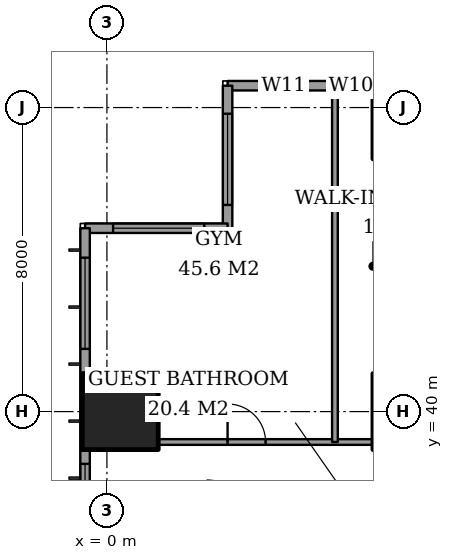
"""IFC4 building model, lengths in metres.
Left out: names, types, materials, properties, quantities, classifications, styles, units other than length and angle.
Written with IfcOpenShell. Run it as: python <this file> out.ifc"""

import sys

from ifc_helpers import new_model, si_unit, direction, frame, frame_2d, origin, origin_2d, place, context, subcontext, project, spatial, rectangle, extrude, element, fill, save


model = new_model("IFC4")
c1 = context("Model", 3, precision=1e-05, world=origin(), true_north=direction((0.0, 1.0)))
c2 = subcontext(c1, "Body", "Model", "MODEL_VIEW")
j1 = project(units=[si_unit("LENGTHUNIT", "METRE"), si_unit("PLANEANGLEUNIT", "RADIAN")], contexts=[c1])
p1 = place(None, origin())
s1 = spatial("IfcSite", under=j1, at=p1, CompositionType="ELEMENT")
p2 = place(p1, origin())
s2 = spatial("IfcBuilding", under=s1, at=p2, CompositionType="ELEMENT")
p3 = place(p2, frame((0.0, 0.0, 114.2)))
s3 = spatial("IfcBuildingStorey", under=s2, at=p3, CompositionType="ELEMENT", Elevation=114.2)
p4 = place(p3, frame((0.35, 40.0, 0.0), z_axis=(0.0, 0.0, 1.0), x_axis=(1.0, 0.0, 0.0)))
e1 = element("IfcColumn", 1, at=p4, inside=s3, PredefinedType="COLUMN", context=c2, shape_type="SweptSolid", body=[
    extrude(rectangle(XDim=2.0, YDim=2.0, at=origin_2d()), origin(), (0.0, 0.0, 1.0), 3.6),
])
p5 = place(p3, frame((24.575, 48.575, 0.0), z_axis=(0.0, 0.0, 1.0), x_axis=(-1.0, 0.0, 0.0)))
e2 = element("IfcWall", 2, at=p5, inside=s3, PredefinedType="SOLIDWALL", context=c2, shape_type="SweptSolid", body=[
    extrude(rectangle(XDim=21.4, YDim=0.25, at=frame_2d((10.7, 0.0))), origin(), (0.0, 0.0, 1.0), 3.6),
])
p6 = place(p5, frame((2.275, 0.0, 0.4)))
e3 = element("IfcOpeningElement", 3, at=p6, cuts=e2, PredefinedType="OPENING", context=c2, shape_type="SweptSolid", body=[
    extrude(rectangle(XDim=1.2, YDim=2.2, at=frame_2d((0.6, 1.1))), frame((0.0, 0.135, 0.0), z_axis=(0.0, -1.0, 0.0), x_axis=(1.0, 0.0, 0.0)), (0.0, 0.0, 1.0), 0.27),
])
p7 = place(p5, frame((4.425, 0.0, 0.4)))
e4 = element("IfcOpeningElement", 4, at=p7, cuts=e2, PredefinedType="OPENING", context=c2, shape_type="SweptSolid", body=[
    extrude(rectangle(XDim=2.4, YDim=2.2, at=frame_2d((1.2, 1.1))), frame((0.0, 0.135, 0.0), z_axis=(0.0, -1.0, 0.0), x_axis=(1.0, 0.0, 0.0)), (0.0, 0.0, 1.0), 0.27),
])
p8 = place(p5, frame((10.4, 0.0, 0.4)))
e5 = element("IfcOpeningElement", 5, at=p8, cuts=e2, PredefinedType="OPENING", context=c2, shape_type="SweptSolid", body=[
    extrude(rectangle(XDim=1.2, YDim=2.2, at=frame_2d((0.6, 1.1))), frame((0.0, 0.135, 0.0), z_axis=(0.0, -1.0, 0.0), x_axis=(1.0, 0.0, 0.0)), (0.0, 0.0, 1.0), 0.27),
])
p9 = place(p5, frame((12.475, 0.0, 0.4)))
e6 = element("IfcOpeningElement", 6, at=p9, cuts=e2, PredefinedType="OPENING", context=c2, shape_type="SweptSolid", body=[
    extrude(rectangle(XDim=2.4, YDim=2.2, at=frame_2d((1.2, 1.1))), frame((0.0, 0.135, 0.0), z_axis=(0.0, -1.0, 0.0), x_axis=(1.0, 0.0, 0.0)), (0.0, 0.0, 1.0), 0.27),
])
p10 = place(p5, frame((17.85, 0.0, 0.4)))
e7 = element("IfcOpeningElement", 7, at=p10, cuts=e2, PredefinedType="OPENING", context=c2, shape_type="SweptSolid", body=[
    extrude(rectangle(XDim=0.6, YDim=2.2, at=frame_2d((0.3, 1.1))), frame((0.0, 0.135, 0.0), z_axis=(0.0, -1.0, 0.0), x_axis=(1.0, 0.0, 0.0)), (0.0, 0.0, 1.0), 0.27),
])
p11 = place(p5, frame((19.325, 0.0, 0.4)))
e8 = element("IfcOpeningElement", 8, at=p11, cuts=e2, PredefinedType="OPENING", context=c2, shape_type="SweptSolid", body=[
    extrude(rectangle(XDim=1.2, YDim=2.2, at=frame_2d((0.6, 1.1))), frame((0.0, 0.135, 0.0), z_axis=(0.0, -1.0, 0.0), x_axis=(1.0, 0.0, 0.0)), (0.0, 0.0, 1.0), 0.27),
])
p12 = place(p3, frame((3.175, 48.575, 0.0), z_axis=(0.0, 0.0, 1.0), x_axis=(0.0, -1.0, 0.0)))
e9 = element("IfcWall", 9, at=p12, inside=s3, PredefinedType="SOLIDWALL", context=c2, shape_type="SweptSolid", body=[
    extrude(rectangle(XDim=3.75, YDim=0.25, at=frame_2d((1.875, 0.0))), origin(), (0.0, 0.0, 1.0), 3.6),
])
p13 = place(p12, frame((0.738, 0.0, 0.4)))
e10 = element("IfcOpeningElement", 10, at=p13, cuts=e9, PredefinedType="OPENING", context=c2, shape_type="SweptSolid", body=[
    extrude(rectangle(XDim=2.4, YDim=2.2, at=frame_2d((1.2, 1.1))), frame((0.0, 0.135, 0.0), z_axis=(0.0, -1.0, 0.0), x_axis=(1.0, 0.0, 0.0)), (0.0, 0.0, 1.0), 0.27),
])
p14 = place(p3, frame((3.175, 44.825, 0.0), z_axis=(0.0, 0.0, 1.0), x_axis=(-1.0, 0.0, 0.0)))
e11 = element("IfcWall", 11, at=p14, inside=s3, PredefinedType="SOLIDWALL", context=c2, shape_type="SweptSolid", body=[
    extrude(rectangle(XDim=3.75, YDim=0.25, at=frame_2d((1.875, 0.0))), origin(), (0.0, 0.0, 1.0), 3.6),
])
p15 = place(p14, frame((0.613, 0.0, 0.4)))
e12 = element("IfcOpeningElement", 12, at=p15, cuts=e11, PredefinedType="OPENING", context=c2, shape_type="SweptSolid", body=[
    extrude(rectangle(XDim=2.4, YDim=2.2, at=frame_2d((1.2, 1.1))), frame((0.0, 0.135, 0.0), z_axis=(0.0, -1.0, 0.0), x_axis=(1.0, 0.0, 0.0)), (0.0, 0.0, 1.0), 0.27),
])
p16 = place(p3, frame((-0.575, 44.825, 0.0), z_axis=(0.0, 0.0, 1.0), x_axis=(0.0, -1.0, 0.0)))
e13 = element("IfcWall", 13, at=p16, inside=s3, PredefinedType="SOLIDWALL", context=c2, shape_type="SweptSolid", body=[
    extrude(rectangle(XDim=41.65, YDim=0.25, at=frame_2d((20.825, 0.0))), origin(), (0.0, 0.0, 1.0), 3.6),
])
p17 = place(p16, frame((0.775, 0.0, 0.4)))
e14 = element("IfcOpeningElement", 14, at=p17, cuts=e13, PredefinedType="OPENING", context=c2, shape_type="SweptSolid", body=[
    extrude(rectangle(XDim=2.4, YDim=2.2, at=frame_2d((1.2, 1.1))), frame((0.0, 0.135, 0.0), z_axis=(0.0, -1.0, 0.0), x_axis=(1.0, 0.0, 0.0)), (0.0, 0.0, 1.0), 0.27),
])
p18 = place(p16, frame((6.2, 0.0, 0.4)))
e15 = element("IfcOpeningElement", 15, at=p18, cuts=e13, PredefinedType="OPENING", context=c2, shape_type="SweptSolid", body=[
    extrude(rectangle(XDim=1.2, YDim=2.2, at=frame_2d((0.6, 1.1))), frame((0.0, 0.135, 0.0), z_axis=(0.0, -1.0, 0.0), x_axis=(1.0, 0.0, 0.0)), (0.0, 0.0, 1.0), 0.27),
])
p19 = place(p16, frame((8.525, 0.0, 0.4)))
e16 = element("IfcOpeningElement", 16, at=p19, cuts=e13, PredefinedType="OPENING", context=c2, shape_type="SweptSolid", body=[
    extrude(rectangle(XDim=2.4, YDim=2.2, at=frame_2d((1.2, 1.1))), frame((0.0, 0.135, 0.0), z_axis=(0.0, -1.0, 0.0), x_axis=(1.0, 0.0, 0.0)), (0.0, 0.0, 1.0), 0.27),
])
p20 = place(p16, frame((15.625, 0.0, 0.4)))
e17 = element("IfcOpeningElement", 17, at=p20, cuts=e13, PredefinedType="OPENING", context=c2, shape_type="SweptSolid", body=[
    extrude(rectangle(XDim=2.4, YDim=2.2, at=frame_2d((1.2, 1.1))), frame((0.0, 0.135, 0.0), z_axis=(0.0, -1.0, 0.0), x_axis=(1.0, 0.0, 0.0)), (0.0, 0.0, 1.0), 0.27),
])
p21 = place(p16, frame((23.625, 0.0, 0.4)))
e18 = element("IfcOpeningElement", 18, at=p21, cuts=e13, PredefinedType="OPENING", context=c2, shape_type="SweptSolid", body=[
    extrude(rectangle(XDim=2.4, YDim=2.2, at=frame_2d((1.2, 1.1))), frame((0.0, 0.135, 0.0), z_axis=(0.0, -1.0, 0.0), x_axis=(1.0, 0.0, 0.0)), (0.0, 0.0, 1.0), 0.27),
])
p22 = place(p16, frame((30.825, 0.0, 0.4)))
e19 = element("IfcOpeningElement", 19, at=p22, cuts=e13, PredefinedType="OPENING", context=c2, shape_type="SweptSolid", body=[
    extrude(rectangle(XDim=2.4, YDim=2.2, at=frame_2d((1.2, 1.1))), frame((0.0, 0.135, 0.0), z_axis=(0.0, -1.0, 0.0), x_axis=(1.0, 0.0, 0.0)), (0.0, 0.0, 1.0), 0.27),
])
p23 = place(p16, frame((34.5, 0.0, 0.4)))
e20 = element("IfcOpeningElement", 20, at=p23, cuts=e13, PredefinedType="OPENING", context=c2, shape_type="SweptSolid", body=[
    extrude(rectangle(XDim=1.2, YDim=2.2, at=frame_2d((0.6, 1.1))), frame((0.0, 0.135, 0.0), z_axis=(0.0, -1.0, 0.0), x_axis=(1.0, 0.0, 0.0)), (0.0, 0.0, 1.0), 0.27),
])
p24 = place(p16, frame((38.475, 0.0, 0.4)))
e21 = element("IfcOpeningElement", 21, at=p24, cuts=e13, PredefinedType="OPENING", context=c2, shape_type="SweptSolid", body=[
    extrude(rectangle(XDim=2.4, YDim=2.2, at=frame_2d((1.2, 1.1))), frame((0.0, 0.135, 0.0), z_axis=(0.0, -1.0, 0.0), x_axis=(1.0, 0.0, 0.0)), (0.0, 0.0, 1.0), 0.27),
])
p25 = place(p3, frame((1.35, 39.2, 0.0), z_axis=(0.0, 0.0, 1.0), x_axis=(1.0, 0.0, 0.0)))
e22 = element("IfcWall", 22, at=p25, inside=s3, PredefinedType="PARTITIONING", context=c2, shape_type="SweptSolid", body=[
    extrude(rectangle(XDim=5.65, YDim=0.15, at=frame_2d((2.825, 0.0))), origin(), (0.0, 0.0, 1.0), 3.35),
])
p26 = place(p25, frame((1.825, 0.0, 0.0)))
e23 = element("IfcOpeningElement", 23, at=p26, cuts=e22, PredefinedType="OPENING", context=c2, shape_type="SweptSolid", body=[
    extrude(rectangle(XDim=1.0, YDim=2.1, at=frame_2d((0.5, 1.05))), frame((0.0, 0.085, 0.0), z_axis=(0.0, -1.0, 0.0), x_axis=(1.0, 0.0, 0.0)), (0.0, 0.0, 1.0), 0.17),
])
p27 = place(p3, frame((6.0, 39.2, 0.0), z_axis=(0.0, 0.0, 1.0), x_axis=(0.0, 1.0, 0.0)))
e24 = element("IfcWall", 24, at=p27, inside=s3, PredefinedType="PARTITIONING", context=c2, shape_type="SweptSolid", body=[
    extrude(rectangle(XDim=9.25, YDim=0.15, at=frame_2d((4.625, 0.0))), origin(), (0.0, 0.0, 1.0), 3.35),
])
p28 = place(p10, origin())
e25 = element("IfcWindow", 25, at=p28, inside=s3, PartitioningType="SINGLE_PANEL", PredefinedType="WINDOW", context=c2, shape_type="SweptSolid", body=[
    extrude(rectangle(XDim=0.6, YDim=2.2, at=frame_2d((0.3, 1.1))), frame((0.0, 0.03, 0.0), z_axis=(0.0, -1.0, 0.0), x_axis=(1.0, 0.0, 0.0)), (0.0, 0.0, 1.0), 0.06),
])
fill(e7, e25)
p29 = place(p11, origin())
e26 = element("IfcWindow", 26, at=p29, inside=s3, PartitioningType="SINGLE_PANEL", PredefinedType="WINDOW", context=c2, shape_type="SweptSolid", body=[
    extrude(rectangle(XDim=1.2, YDim=2.2, at=frame_2d((0.6, 1.1))), frame((0.0, 0.03, 0.0), z_axis=(0.0, -1.0, 0.0), x_axis=(1.0, 0.0, 0.0)), (0.0, 0.0, 1.0), 0.06),
])
fill(e8, e26)
p30 = place(p13, origin())
e27 = element("IfcWindow", 27, at=p30, inside=s3, PartitioningType="SINGLE_PANEL", PredefinedType="WINDOW", context=c2, shape_type="SweptSolid", body=[
    extrude(rectangle(XDim=2.4, YDim=2.2, at=frame_2d((1.2, 1.1))), frame((0.0, 0.03, 0.0), z_axis=(0.0, -1.0, 0.0), x_axis=(1.0, 0.0, 0.0)), (0.0, 0.0, 1.0), 0.06),
])
fill(e10, e27)
p31 = place(p15, origin())
e28 = element("IfcWindow", 28, at=p31, inside=s3, PartitioningType="SINGLE_PANEL", PredefinedType="WINDOW", context=c2, shape_type="SweptSolid", body=[
    extrude(rectangle(XDim=2.4, YDim=2.2, at=frame_2d((1.2, 1.1))), frame((0.0, 0.03, 0.0), z_axis=(0.0, -1.0, 0.0), x_axis=(1.0, 0.0, 0.0)), (0.0, 0.0, 1.0), 0.06),
])
fill(e12, e28)
p32 = place(p17, origin())
e29 = element("IfcWindow", 29, at=p32, inside=s3, PartitioningType="SINGLE_PANEL", PredefinedType="WINDOW", context=c2, shape_type="SweptSolid", body=[
    extrude(rectangle(XDim=2.4, YDim=2.2, at=frame_2d((1.2, 1.1))), frame((0.0, 0.03, 0.0), z_axis=(0.0, -1.0, 0.0), x_axis=(1.0, 0.0, 0.0)), (0.0, 0.0, 1.0), 0.06),
])
fill(e14, e29)
p33 = place(p18, origin())
e30 = element("IfcWindow", 30, at=p33, inside=s3, PartitioningType="SINGLE_PANEL", PredefinedType="WINDOW", context=c2, shape_type="SweptSolid", body=[
    extrude(rectangle(XDim=1.2, YDim=2.2, at=frame_2d((0.6, 1.1))), frame((0.0, 0.03, 0.0), z_axis=(0.0, -1.0, 0.0), x_axis=(1.0, 0.0, 0.0)), (0.0, 0.0, 1.0), 0.06),
])
fill(e15, e30)
p34 = place(p26, origin())
e31 = element("IfcDoor", 31, at=p34, inside=s3, OperationType="SINGLE_SWING_RIGHT", PredefinedType="DOOR", context=c2, shape_type="SweptSolid", body=[
    extrude(rectangle(XDim=1.0, YDim=2.1, at=frame_2d((0.5, 1.05))), frame((0.0, 0.025, 0.0), z_axis=(0.0, -1.0, 0.0), x_axis=(1.0, 0.0, 0.0)), (0.0, 0.0, 1.0), 0.05),
])
fill(e23, e31)
save(model, sys.argv[1])
